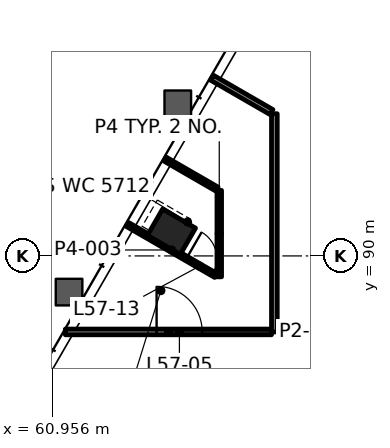
"""IFC4 building model, lengths in metres.
Left out: names, types, materials, properties, quantities, classifications, styles, units other than length and angle.
Written with IfcOpenShell. Run it as: python <this file> out.ifc"""

import sys

from ifc_helpers import new_model, si_unit, direction, frame, frame_2d, origin, origin_2d, place, context, subcontext, project, spatial, rectangle, hollow_rectangle, extrude, element, fill, save


model = new_model("IFC4")
c1 = context("Model", 3, precision=1e-05, world=origin(), true_north=direction((0.0, 1.0)))
c2 = subcontext(c1, "Body", "Model", "MODEL_VIEW")
j1 = project(units=[si_unit("LENGTHUNIT", "METRE"), si_unit("PLANEANGLEUNIT", "RADIAN")], contexts=[c1])
p1 = place(None, origin())
s1 = spatial("IfcSite", under=j1, at=p1, CompositionType="ELEMENT")
p2 = place(p1, origin())
s2 = spatial("IfcBuilding", under=s1, at=p2, CompositionType="ELEMENT")
p3 = place(p2, frame((0.0, 0.0, 241.6)))
s3 = spatial("IfcBuildingStorey", under=s2, at=p3, CompositionType="ELEMENT", Elevation=241.6)
p4 = place(p3, frame((64.092, 90.636, -0.0), z_axis=(0.0, 0.0, 1.0), x_axis=(-0.5, -0.866025403784, 0.0)))
e1 = element("IfcColumn", 1, at=p4, inside=s3, PredefinedType="COLUMN", context=c2, shape_type="SweptSolid", body=[
    extrude(hollow_rectangle(XDim=0.8, YDim=1.0, WallThickness=0.05, at=origin_2d()), origin(), (0.0, 0.0, 1.0), 6.0),
])
p5 = place(p3, frame((61.3, 88.0, 0.0), z_axis=(0.0, 0.0, 1.0), x_axis=(1.0, 0.0, 0.0)))
e2 = element("IfcWall", 2, at=p5, inside=s3, PredefinedType="PARTITIONING", context=c2, shape_type="SweptSolid", body=[
    extrude(rectangle(XDim=5.426, YDim=0.15, at=frame_2d((2.713, 0.0))), origin(), (0.0, 0.0, 1.0), 4.872),
])
p6 = place(p5, frame((2.401, 0.0, 0.0)))
e3 = element("IfcOpeningElement", 3, at=p6, cuts=e2, PredefinedType="OPENING", context=c2, shape_type="SweptSolid", body=[
    extrude(rectangle(XDim=1.2, YDim=2.1, at=frame_2d((0.6, 1.05))), frame((0.0, 0.085, 0.0), z_axis=(0.0, -1.0, 0.0), x_axis=(1.0, 0.0, 0.0)), (0.0, 0.0, 1.0), 0.17),
])
p7 = place(p3, frame((66.8, 88.0, 0.0), z_axis=(0.0, 0.0, 1.0), x_axis=(0.0, 1.0, 0.0)))
e4 = element("IfcWall", 4, at=p7, inside=s3, PredefinedType="PARTITIONING", context=c2, shape_type="SweptSolid", body=[
    extrude(rectangle(XDim=5.742, YDim=0.15, at=frame_2d((2.871, 0.0))), origin(), (0.0, 0.0, 1.0), 4.95),
])
p8 = place(p3, frame((65.35, 89.45, 0.0), z_axis=(0.0, 0.0, 1.0), x_axis=(0.0, 1.0, 0.0)))
e5 = element("IfcWall", 5, at=p8, inside=s3, PredefinedType="PARTITIONING", context=c2, shape_type="SweptSolid", body=[
    extrude(rectangle(XDim=2.274, YDim=0.12, at=frame_2d((1.137, 0.0))), origin(), (0.0, 0.0, 1.0), 4.95),
])
p9 = place(p3, frame((66.725, 93.785, 0.0), z_axis=(0.0, 0.0, 1.0), x_axis=(-0.866021216079, 0.500007253249, 0.0)))
e6 = element("IfcWall", 6, at=p9, inside=s3, PredefinedType="PARTITIONING", context=c2, shape_type="SweptSolid", body=[
    extrude(rectangle(XDim=1.806, YDim=0.15, at=frame_2d((0.903, 0.0))), origin(), (0.0, 0.0, 1.0), 4.872),
])
p10 = place(p3, frame((65.29, 91.758, 0.0), z_axis=(0.0, 0.0, 1.0), x_axis=(-0.86599473702, 0.500053112632, 0.0)))
e7 = element("IfcWall", 7, at=p10, inside=s3, PredefinedType="PARTITIONING", context=c2, shape_type="SweptSolid", body=[
    extrude(rectangle(XDim=1.576, YDim=0.12, at=frame_2d((0.788, 0.0))), origin(), (0.0, 0.0, 1.0), 4.872),
])
p11 = place(p3, frame((62.933, 90.828, 0.0), z_axis=(0.0, 0.0, 1.0), x_axis=(0.866053945006, -0.499950561895, 0.0)))
e8 = element("IfcWall", 8, at=p11, inside=s3, PredefinedType="PARTITIONING", context=c2, shape_type="SweptSolid", body=[
    extrude(rectangle(XDim=2.687, YDim=0.12, at=frame_2d((1.343, 0.0))), origin(), (0.0, 0.0, 1.0), 4.872),
])
p12 = place(p11, frame((1.793, 0.0, 0.0)))
e9 = element("IfcOpeningElement", 9, at=p12, cuts=e8, PredefinedType="OPENING", context=c2, shape_type="SweptSolid", body=[
    extrude(rectangle(XDim=0.8, YDim=2.1, at=frame_2d((0.4, 1.05))), frame((0.0, 0.07, 0.0), z_axis=(0.0, -1.0, 0.0), x_axis=(1.0, 0.0, 0.0)), (0.0, 0.0, 1.0), 0.14),
])
p13 = place(p6, origin())
e10 = element("IfcDoor", 10, at=p13, inside=s3, OperationType="DOUBLE_DOOR_SINGLE_SWING", PredefinedType="DOOR", context=c2, shape_type="SweptSolid", body=[
    extrude(rectangle(XDim=1.2, YDim=2.1, at=frame_2d((0.6, 1.05))), frame((0.0, 0.025, 0.0), z_axis=(0.0, -1.0, 0.0), x_axis=(1.0, 0.0, 0.0)), (0.0, 0.0, 1.0), 0.05),
])
fill(e3, e10)
p14 = place(p12, origin())
e11 = element("IfcDoor", 11, at=p14, inside=s3, OperationType="SINGLE_SWING_RIGHT", PredefinedType="DOOR", context=c2, shape_type="SweptSolid", body=[
    extrude(rectangle(XDim=0.8, YDim=2.1, at=frame_2d((0.4, 1.05))), frame((0.0, 0.025, 0.0), z_axis=(0.0, -1.0, 0.0), x_axis=(1.0, 0.0, 0.0)), (0.0, 0.0, 1.0), 0.05),
])
fill(e9, e11)
save(model, sys.argv[1])
